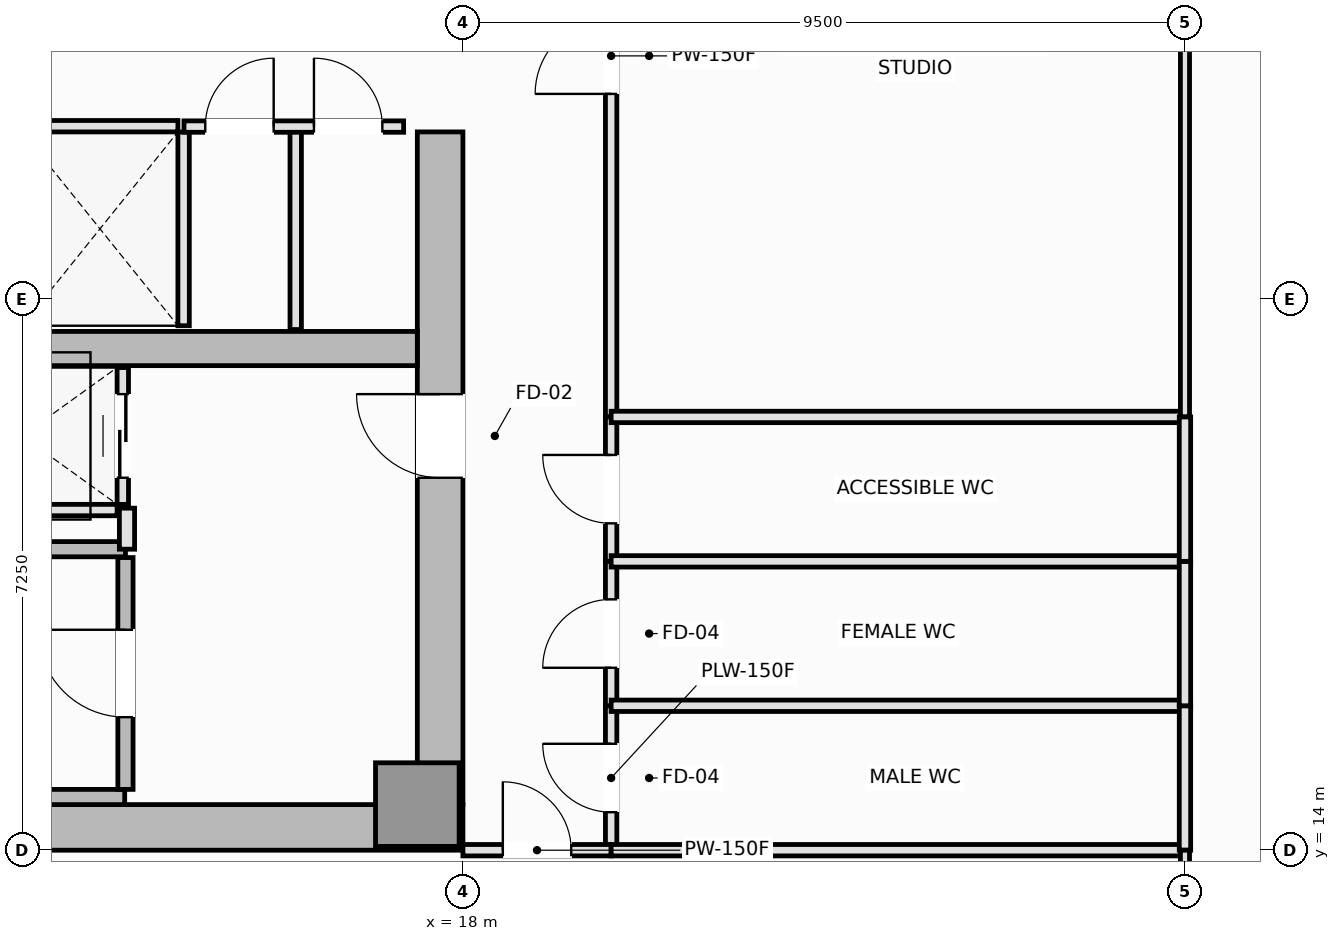
"""IFC4 building model, lengths in metres.
Left out: names, types, materials, properties, quantities, classifications, styles, units other than length and angle.
Written with IfcOpenShell. Run it as: python <this file> out.ifc"""

import sys

from ifc_helpers import new_model, si_unit, direction, frame, frame_2d, origin, origin_2d, place, context, subcontext, project, spatial, rectangle, extrude, element, fill, save


model = new_model("IFC4")
c1 = context("Model", 3, precision=1e-05, world=origin(), true_north=direction((0.0, 1.0)))
c2 = subcontext(c1, "Body", "Model", "MODEL_VIEW")
j1 = project(units=[si_unit("LENGTHUNIT", "METRE"), si_unit("PLANEANGLEUNIT", "RADIAN")], contexts=[c1])
p1 = place(None, origin())
s1 = spatial("IfcSite", under=j1, at=p1, CompositionType="ELEMENT")
p2 = place(p1, origin())
s2 = spatial("IfcBuilding", under=s1, at=p2, CompositionType="ELEMENT")
p3 = place(p2, frame((0.0, 0.0, 116.45)))
s3 = spatial("IfcBuildingStorey", under=s2, at=p3, CompositionType="ELEMENT", Elevation=116.45)
p4 = place(p3, frame((4.5, 14.3, 0.0), z_axis=(0.0, 0.0, 1.0), x_axis=(1.0, 0.0, 0.0)))
e1 = element("IfcWall", 1, at=p4, inside=s3, PredefinedType="SHEAR", context=c2, shape_type="SweptSolid", body=[
    extrude(rectangle(XDim=13.5, YDim=0.6, at=frame_2d((6.75, 0.0))), origin(), (0.0, 0.0, 1.0), 3.55),
])
p5 = place(p3, frame((17.7, 14.6, 0.0), z_axis=(0.0, 0.0, 1.0), x_axis=(0.0, 1.0, 0.0)))
e2 = element("IfcWall", 2, at=p5, inside=s3, PredefinedType="SHEAR", context=c2, shape_type="SweptSolid", body=[
    extrude(rectangle(XDim=8.85, YDim=0.6, at=frame_2d((4.425, 0.0))), origin(), (0.0, 0.0, 1.0), 3.55),
])
p6 = place(p5, frame((4.3, 0.0, 0.0)))
e3 = element("IfcOpeningElement", 3, at=p6, cuts=e2, PredefinedType="OPENING", context=c2, shape_type="SweptSolid", body=[
    extrude(rectangle(XDim=1.1, YDim=2.15, at=frame_2d((0.55, 1.075))), frame((0.0, 0.31, 0.0), z_axis=(0.0, -1.0, 0.0), x_axis=(1.0, 0.0, 0.0)), (0.0, 0.0, 1.0), 0.62),
])
p7 = place(p3, frame((5.1, 20.6, 0.0), z_axis=(0.0, 0.0, 1.0), x_axis=(1.0, 0.0, 0.0)))
e4 = element("IfcWall", 4, at=p7, inside=s3, PredefinedType="SHEAR", context=c2, shape_type="SweptSolid", body=[
    extrude(rectangle(XDim=12.3, YDim=0.45, at=frame_2d((6.15, 0.0))), origin(), (0.0, 0.0, 1.0), 3.55),
])
p8 = place(p3, frame((17.4, 14.6, 0.0), z_axis=(0.0, 0.0, 1.0), x_axis=(1.0, 0.0, 0.0)))
e5 = element("IfcColumn", 5, at=p8, inside=s3, PredefinedType="PILASTER", context=c2, shape_type="SweptSolid", body=[
    extrude(rectangle(XDim=1.1, YDim=1.1, at=origin_2d()), origin(), (0.0, 0.0, 1.0), 3.55),
])
p9 = place(p3, frame((5.8, 14.7, 0.0), z_axis=(0.0, 0.0, 1.0), x_axis=(1.0, 0.0, 0.0)))
e6 = element("IfcWall", 6, at=p9, inside=s3, PredefinedType="SOLIDWALL", context=c2, shape_type="SweptSolid", body=[
    extrude(rectangle(XDim=7.75, YDim=0.2, at=frame_2d((3.875, 0.0))), origin(), (0.0, 0.0, 1.0), 3.55),
])
p10 = place(p3, frame((5.9, 17.96, 0.0), z_axis=(0.0, 0.0, 1.0), x_axis=(1.0, 0.0, 0.0)))
e7 = element("IfcWall", 7, at=p10, inside=s3, PredefinedType="SOLIDWALL", context=c2, shape_type="SweptSolid", body=[
    extrude(rectangle(XDim=7.66, YDim=0.2, at=frame_2d((3.83, 0.0))), origin(), (0.0, 0.0, 1.0), 3.55),
])
p11 = place(p3, frame((13.56, 14.8, 0.0), z_axis=(0.0, 0.0, 1.0), x_axis=(0.0, 1.0, 0.0)))
e8 = element("IfcWall", 8, at=p11, inside=s3, PredefinedType="SOLIDWALL", context=c2, shape_type="SweptSolid", body=[
    extrude(rectangle(XDim=3.05, YDim=0.2, at=frame_2d((1.525, 0.0))), origin(), (0.0, 0.0, 1.0), 3.55),
])
p12 = place(p11, frame((0.95, 0.0, 0.0)))
e9 = element("IfcOpeningElement", 9, at=p12, cuts=e8, PredefinedType="OPENING", context=c2, shape_type="SweptSolid", body=[
    extrude(rectangle(XDim=1.15, YDim=2.15, at=frame_2d((0.575, 1.075))), frame((0.0, 0.11, 0.0), z_axis=(0.0, -1.0, 0.0), x_axis=(1.0, 0.0, 0.0)), (0.0, 0.0, 1.0), 0.22),
])
p13 = place(p3, frame((12.2, 23.525, 0.0), z_axis=(0.0, 0.0, 1.0), x_axis=(1.0, 0.0, 0.0)))
e10 = element("IfcWall", 10, at=p13, inside=s3, PredefinedType="PARTITIONING", context=c2, shape_type="SweptSolid", body=[
    extrude(rectangle(XDim=2.05, YDim=0.15, at=frame_2d((1.025, 0.0))), origin(), (0.0, 0.0, 1.0), 3.37),
])
p14 = place(p3, frame((14.325, 20.9, 0.0), z_axis=(0.0, 0.0, 1.0), x_axis=(0.0, 1.0, 0.0)))
e11 = element("IfcWall", 11, at=p14, inside=s3, PredefinedType="PARTITIONING", context=c2, shape_type="SweptSolid", body=[
    extrude(rectangle(XDim=2.55, YDim=0.15, at=frame_2d((1.275, 0.0))), origin(), (0.0, 0.0, 1.0), 3.37),
])
p15 = place(p3, frame((10.95, 18.475, 0.0), z_axis=(0.0, 0.0, 1.0), x_axis=(1.0, 0.0, 0.0)))
e12 = element("IfcWall", 12, at=p15, inside=s3, PredefinedType="PARTITIONING", context=c2, shape_type="SweptSolid", body=[
    extrude(rectangle(XDim=2.5, YDim=0.15, at=frame_2d((1.25, 0.0))), origin(), (0.0, 0.0, 1.0), 3.37),
])
p16 = place(p3, frame((13.525, 18.55, 0.0), z_axis=(0.0, 0.0, 1.0), x_axis=(0.0, 1.0, 0.0)))
e13 = element("IfcWall", 13, at=p16, inside=s3, PredefinedType="PARTITIONING", context=c2, shape_type="SweptSolid", body=[
    extrude(rectangle(XDim=1.8, YDim=0.15, at=frame_2d((0.9, 0.0))), origin(), (0.0, 0.0, 1.0), 3.37),
])
p17 = place(p16, frame((0.35, 0.0, 0.0)))
e14 = element("IfcOpeningElement", 14, at=p17, cuts=e13, PredefinedType="OPENING", context=c2, shape_type="SweptSolid", body=[
    extrude(rectangle(XDim=1.1, YDim=2.2, at=frame_2d((0.55, 1.1))), frame((0.0, 0.085, 0.0), z_axis=(0.0, -1.0, 0.0), x_axis=(1.0, 0.0, 0.0)), (0.0, 0.0, 1.0), 0.17),
])
p18 = place(p3, frame((13.58, 17.96, 0.0), z_axis=(0.0, 0.0, 1.0), x_axis=(0.0, 1.0, 0.0)))
e15 = element("IfcWall", 15, at=p18, inside=s3, PredefinedType="PARTITIONING", context=c2, shape_type="SweptSolid", body=[
    extrude(rectangle(XDim=0.54, YDim=0.2, at=frame_2d((0.27, 0.0))), origin(), (0.0, 0.0, 1.0), 3.37),
])
p19 = place(p3, frame((15.8, 20.85, 0.0), z_axis=(0.0, 0.0, 1.0), x_axis=(0.0, 1.0, 0.0)))
e16 = element("IfcWall", 16, at=p19, inside=s3, PredefinedType="PARTITIONING", context=c2, shape_type="SweptSolid", body=[
    extrude(rectangle(XDim=2.67, YDim=0.15, at=frame_2d((1.335, 0.0))), origin(), (0.0, 0.0, 1.0), 3.37),
])
p20 = place(p3, frame((14.33, 23.52, 0.0), z_axis=(0.0, 0.0, 1.0), x_axis=(1.0, 0.0, 0.0)))
e17 = element("IfcWall", 17, at=p20, inside=s3, PredefinedType="PARTITIONING", context=c2, shape_type="SweptSolid", body=[
    extrude(rectangle(XDim=2.89, YDim=0.15, at=frame_2d((1.445, 0.0))), origin(), (0.0, 0.0, 1.0), 3.37),
])
p21 = place(p20, frame((0.28, 0.0, 0.0)))
e18 = element("IfcOpeningElement", 18, at=p21, cuts=e17, PredefinedType="OPENING", context=c2, shape_type="SweptSolid", body=[
    extrude(rectangle(XDim=0.9, YDim=2.1, at=frame_2d((0.45, 1.05))), frame((0.0, 0.085, 0.0), z_axis=(0.0, -1.0, 0.0), x_axis=(1.0, 0.0, 0.0)), (0.0, 0.0, 1.0), 0.17),
])
p22 = place(p20, frame((1.71, 0.0, 0.0)))
e19 = element("IfcOpeningElement", 19, at=p22, cuts=e17, PredefinedType="OPENING", context=c2, shape_type="SweptSolid", body=[
    extrude(rectangle(XDim=0.9, YDim=2.1, at=frame_2d((0.45, 1.05))), frame((0.0, 0.085, 0.0), z_axis=(0.0, -1.0, 0.0), x_axis=(1.0, 0.0, 0.0)), (0.0, 0.0, 1.0), 0.17),
])
p23 = place(p3, frame((19.95, 19.7, 0.0), z_axis=(0.0, 0.0, 1.0), x_axis=(0.0, 1.0, 0.0)))
e20 = element("IfcWall", 20, at=p23, inside=s3, PredefinedType="PARTITIONING", context=c2, shape_type="SweptSolid", body=[
    extrude(rectangle(XDim=9.5, YDim=0.15, at=frame_2d((4.75, 0.0))), origin(), (0.0, 0.0, 1.0), 3.37),
])
p24 = place(p23, frame((4.25, 0.0, 0.0)))
e21 = element("IfcOpeningElement", 21, at=p24, cuts=e20, PredefinedType="OPENING", context=c2, shape_type="SweptSolid", body=[
    extrude(rectangle(XDim=1.0, YDim=2.15, at=frame_2d((0.5, 1.075))), frame((0.0, 0.085, 0.0), z_axis=(0.0, -1.0, 0.0), x_axis=(1.0, 0.0, 0.0)), (0.0, 0.0, 1.0), 0.17),
])
p25 = place(p3, frame((19.95, 14.0, 0.0), z_axis=(0.0, 0.0, 1.0), x_axis=(0.0, 1.0, 0.0)))
e22 = element("IfcWall", 22, at=p25, inside=s3, PredefinedType="PLUMBINGWALL", context=c2, shape_type="SweptSolid", body=[
    extrude(rectangle(XDim=1.9, YDim=0.15, at=frame_2d((0.95, 0.0))), origin(), (0.0, 0.0, 1.0), 3.37),
])
p26 = place(p25, frame((0.5, 0.0, 0.0)))
e23 = element("IfcOpeningElement", 23, at=p26, cuts=e22, PredefinedType="OPENING", context=c2, shape_type="SweptSolid", body=[
    extrude(rectangle(XDim=0.9, YDim=2.1, at=frame_2d((0.45, 1.05))), frame((0.0, 0.085, 0.0), z_axis=(0.0, -1.0, 0.0), x_axis=(1.0, 0.0, 0.0)), (0.0, 0.0, 1.0), 0.17),
])
p27 = place(p3, frame((19.95, 15.9, 0.0), z_axis=(0.0, 0.0, 1.0), x_axis=(0.0, 1.0, 0.0)))
e24 = element("IfcWall", 24, at=p27, inside=s3, PredefinedType="PLUMBINGWALL", context=c2, shape_type="SweptSolid", body=[
    extrude(rectangle(XDim=1.9, YDim=0.15, at=frame_2d((0.95, 0.0))), origin(), (0.0, 0.0, 1.0), 3.37),
])
p28 = place(p27, frame((0.5, 0.0, 0.0)))
e25 = element("IfcOpeningElement", 25, at=p28, cuts=e24, PredefinedType="OPENING", context=c2, shape_type="SweptSolid", body=[
    extrude(rectangle(XDim=0.9, YDim=2.1, at=frame_2d((0.45, 1.05))), frame((0.0, 0.085, 0.0), z_axis=(0.0, -1.0, 0.0), x_axis=(1.0, 0.0, 0.0)), (0.0, 0.0, 1.0), 0.17),
])
p29 = place(p3, frame((19.95, 17.8, 0.0), z_axis=(0.0, 0.0, 1.0), x_axis=(0.0, 1.0, 0.0)))
e26 = element("IfcWall", 26, at=p29, inside=s3, PredefinedType="PLUMBINGWALL", context=c2, shape_type="SweptSolid", body=[
    extrude(rectangle(XDim=1.9, YDim=0.15, at=frame_2d((0.95, 0.0))), origin(), (0.0, 0.0, 1.0), 3.37),
])
p30 = place(p29, frame((0.5, 0.0, 0.0)))
e27 = element("IfcOpeningElement", 27, at=p30, cuts=e26, PredefinedType="OPENING", context=c2, shape_type="SweptSolid", body=[
    extrude(rectangle(XDim=0.9, YDim=2.1, at=frame_2d((0.45, 1.05))), frame((0.0, 0.085, 0.0), z_axis=(0.0, -1.0, 0.0), x_axis=(1.0, 0.0, 0.0)), (0.0, 0.0, 1.0), 0.17),
])
p31 = place(p3, frame((18.0, 14.0, 0.0), z_axis=(0.0, 0.0, 1.0), x_axis=(1.0, 0.0, 0.0)))
e28 = element("IfcWall", 28, at=p31, inside=s3, PredefinedType="PARTITIONING", context=c2, shape_type="SweptSolid", body=[
    extrude(rectangle(XDim=1.95, YDim=0.15, at=frame_2d((0.975, 0.0))), origin(), (0.0, 0.0, 1.0), 3.37),
])
p32 = place(p31, frame((0.525, 0.0, 0.0)))
e29 = element("IfcOpeningElement", 29, at=p32, cuts=e28, PredefinedType="OPENING", context=c2, shape_type="SweptSolid", body=[
    extrude(rectangle(XDim=0.9, YDim=2.1, at=frame_2d((0.45, 1.05))), frame((0.0, 0.085, 0.0), z_axis=(0.0, -1.0, 0.0), x_axis=(1.0, 0.0, 0.0)), (0.0, 0.0, 1.0), 0.17),
])
p33 = place(p3, frame((19.95, 19.7, 0.0), z_axis=(0.0, 0.0, 1.0), x_axis=(1.0, 0.0, 0.0)))
e30 = element("IfcWall", 30, at=p33, inside=s3, PredefinedType="PLUMBINGWALL", context=c2, shape_type="SweptSolid", body=[
    extrude(rectangle(XDim=7.55, YDim=0.15, at=frame_2d((3.775, 0.0))), origin(), (0.0, 0.0, 1.0), 3.37),
])
p34 = place(p3, frame((27.5, 19.7, 0.0), z_axis=(0.0, 0.0, 1.0), x_axis=(0.0, 1.0, 0.0)))
e31 = element("IfcWall", 31, at=p34, inside=s3, PredefinedType="PARTITIONING", context=c2, shape_type="SweptSolid", body=[
    extrude(rectangle(XDim=9.5, YDim=0.12, at=frame_2d((4.75, 0.0))), origin(), (0.0, 0.0, 1.0), 3.37),
])
for number, where, z_axis, x_axis in (
    (32, (19.95, 15.9, 0.0), (0.0, 0.0, 1.0), (1.0, 0.0, 0.0)),
    (33, (19.95, 14.0, 0.0), (0.0, 0.0, 1.0), (1.0, 0.0, 0.0)),
):
    element("IfcWall", number, at=place(p3, frame(where, z_axis=z_axis, x_axis=x_axis)), inside=s3, PredefinedType="PLUMBINGWALL", context=c2, shape_type="SweptSolid", body=[
        extrude(rectangle(XDim=7.55, YDim=0.15, at=frame_2d((3.775, 0.0))), origin(), (0.0, 0.0, 1.0), 3.37),
    ])
p35 = place(p3, frame((27.5, 14.0, 0.0), z_axis=(0.0, 0.0, 1.0), x_axis=(0.0, 1.0, 0.0)))
e34 = element("IfcWall", 34, at=p35, inside=s3, PredefinedType="PLUMBINGWALL", context=c2, shape_type="SweptSolid", body=[
    extrude(rectangle(XDim=1.9, YDim=0.15, at=frame_2d((0.95, 0.0))), origin(), (0.0, 0.0, 1.0), 3.37),
])
p36 = place(p3, frame((19.95, 17.8, 0.0), z_axis=(0.0, 0.0, 1.0), x_axis=(1.0, 0.0, 0.0)))
e35 = element("IfcWall", 35, at=p36, inside=s3, PredefinedType="PLUMBINGWALL", context=c2, shape_type="SweptSolid", body=[
    extrude(rectangle(XDim=7.55, YDim=0.15, at=frame_2d((3.775, 0.0))), origin(), (0.0, 0.0, 1.0), 3.37),
])
p37 = place(p3, frame((27.5, 15.9, 0.0), z_axis=(0.0, 0.0, 1.0), x_axis=(0.0, 1.0, 0.0)))
e36 = element("IfcWall", 36, at=p37, inside=s3, PredefinedType="PLUMBINGWALL", context=c2, shape_type="SweptSolid", body=[
    extrude(rectangle(XDim=1.9, YDim=0.15, at=frame_2d((0.95, 0.0))), origin(), (0.0, 0.0, 1.0), 3.37),
])
p38 = place(p3, frame((27.5, 17.8, 0.0), z_axis=(0.0, 0.0, 1.0), x_axis=(0.0, 1.0, 0.0)))
e37 = element("IfcWall", 37, at=p38, inside=s3, PredefinedType="PLUMBINGWALL", context=c2, shape_type="SweptSolid", body=[
    extrude(rectangle(XDim=1.9, YDim=0.15, at=frame_2d((0.95, 0.0))), origin(), (0.0, 0.0, 1.0), 3.37),
])
p39 = place(p3, frame((27.5, 3.51, 0.0), z_axis=(0.0, 0.0, 1.0), x_axis=(0.0, 1.0, 0.0)))
e38 = element("IfcWall", 38, at=p39, inside=s3, PredefinedType="PARTITIONING", context=c2, shape_type="SweptSolid", body=[
    extrude(rectangle(XDim=10.49, YDim=0.12, at=frame_2d((5.245, 0.0))), origin(), (0.0, 0.0, 1.0), 2.87),
])
p40 = place(p12, origin())
e39 = element("IfcDoor", 39, at=p40, inside=s3, OperationType="SINGLE_SWING_RIGHT", PredefinedType="DOOR", context=c2, shape_type="SweptSolid", body=[
    extrude(rectangle(XDim=1.15, YDim=2.15, at=frame_2d((0.575, 1.075))), frame((0.0, 0.025, 0.0), z_axis=(0.0, -1.0, 0.0), x_axis=(1.0, 0.0, 0.0)), (0.0, 0.0, 1.0), 0.05),
])
fill(e9, e39)
p41 = place(p17, origin())
e40 = element("IfcDoor", 40, at=p41, inside=s3, OperationType="DOUBLE_DOOR_SLIDING", PredefinedType="DOOR", context=c2, shape_type="SweptSolid", body=[
    extrude(rectangle(XDim=1.1, YDim=2.2, at=frame_2d((0.55, 1.1))), frame((0.0, 0.025, 0.0), z_axis=(0.0, -1.0, 0.0), x_axis=(1.0, 0.0, 0.0)), (0.0, 0.0, 1.0), 0.05),
])
fill(e14, e40)
p42 = place(p6, origin())
e41 = element("IfcDoor", 41, at=p42, inside=s3, OperationType="SINGLE_SWING_RIGHT", PredefinedType="DOOR", context=c2, shape_type="SweptSolid", body=[
    extrude(rectangle(XDim=1.1, YDim=2.15, at=frame_2d((0.55, 1.075))), frame((0.0, 0.025, 0.0), z_axis=(0.0, -1.0, 0.0), x_axis=(1.0, 0.0, 0.0)), (0.0, 0.0, 1.0), 0.05),
])
fill(e3, e41)
p43 = place(p21, origin())
e42 = element("IfcDoor", 42, at=p43, inside=s3, OperationType="SINGLE_SWING_RIGHT", PredefinedType="DOOR", context=c2, shape_type="SweptSolid", body=[
    extrude(rectangle(XDim=0.9, YDim=2.1, at=frame_2d((0.45, 1.05))), frame((0.0, 0.025, 0.0), z_axis=(0.0, -1.0, 0.0), x_axis=(1.0, 0.0, 0.0)), (0.0, 0.0, 1.0), 0.05),
])
fill(e18, e42)
p44 = place(p22, origin())
e43 = element("IfcDoor", 43, at=p44, inside=s3, OperationType="SINGLE_SWING_LEFT", PredefinedType="DOOR", context=c2, shape_type="SweptSolid", body=[
    extrude(rectangle(XDim=0.9, YDim=2.1, at=frame_2d((0.45, 1.05))), frame((0.0, 0.025, 0.0), z_axis=(0.0, -1.0, 0.0), x_axis=(1.0, 0.0, 0.0)), (0.0, 0.0, 1.0), 0.05),
])
fill(e19, e43)
p45 = place(p24, origin())
e44 = element("IfcDoor", 44, at=p45, inside=s3, OperationType="SINGLE_SWING_LEFT", PredefinedType="DOOR", context=c2, shape_type="SweptSolid", body=[
    extrude(rectangle(XDim=1.0, YDim=2.15, at=frame_2d((0.5, 1.075))), frame((0.0, 0.025, 0.0), z_axis=(0.0, -1.0, 0.0), x_axis=(1.0, 0.0, 0.0)), (0.0, 0.0, 1.0), 0.05),
])
fill(e21, e44)
p46 = place(p26, origin())
e45 = element("IfcDoor", 45, at=p46, inside=s3, OperationType="SINGLE_SWING_RIGHT", PredefinedType="DOOR", context=c2, shape_type="SweptSolid", body=[
    extrude(rectangle(XDim=0.9, YDim=2.1, at=frame_2d((0.45, 1.05))), frame((0.0, 0.025, 0.0), z_axis=(0.0, -1.0, 0.0), x_axis=(1.0, 0.0, 0.0)), (0.0, 0.0, 1.0), 0.05),
])
fill(e23, e45)
p47 = place(p28, origin())
e46 = element("IfcDoor", 46, at=p47, inside=s3, OperationType="SINGLE_SWING_LEFT", PredefinedType="DOOR", context=c2, shape_type="SweptSolid", body=[
    extrude(rectangle(XDim=0.9, YDim=2.1, at=frame_2d((0.45, 1.05))), frame((0.0, 0.025, 0.0), z_axis=(0.0, -1.0, 0.0), x_axis=(1.0, 0.0, 0.0)), (0.0, 0.0, 1.0), 0.05),
])
fill(e25, e46)
p48 = place(p30, origin())
e47 = element("IfcDoor", 47, at=p48, inside=s3, OperationType="SINGLE_SWING_RIGHT", PredefinedType="DOOR", context=c2, shape_type="SweptSolid", body=[
    extrude(rectangle(XDim=0.9, YDim=2.1, at=frame_2d((0.45, 1.05))), frame((0.0, 0.025, 0.0), z_axis=(0.0, -1.0, 0.0), x_axis=(1.0, 0.0, 0.0)), (0.0, 0.0, 1.0), 0.05),
])
fill(e27, e47)
p49 = place(p32, origin())
e48 = element("IfcDoor", 48, at=p49, inside=s3, OperationType="SINGLE_SWING_LEFT", PredefinedType="DOOR", context=c2, shape_type="SweptSolid", body=[
    extrude(rectangle(XDim=0.9, YDim=2.1, at=frame_2d((0.45, 1.05))), frame((0.0, 0.025, 0.0), z_axis=(0.0, -1.0, 0.0), x_axis=(1.0, 0.0, 0.0)), (0.0, 0.0, 1.0), 0.05),
])
fill(e29, e48)
save(model, sys.argv[1])
